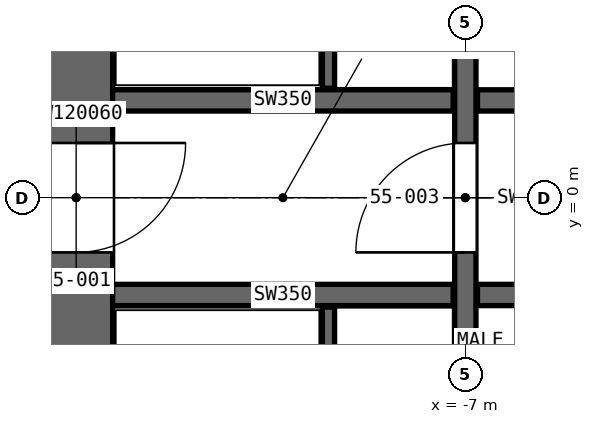
"""IFC4 building model, lengths in metres.
Left out: names, types, materials, properties, quantities, classifications, styles, units other than length and angle.
Written with IfcOpenShell. Run it as: python <this file> out.ifc"""

import sys

from ifc_helpers import new_model, si_unit, direction, frame, frame_2d, origin, place, context, subcontext, project, spatial, rectangle, extrude, element, fill, save


model = new_model("IFC4")
c1 = context("Model", 3, precision=1e-05, world=origin(), true_north=direction((0.0, 1.0)))
c2 = subcontext(c1, "Body", "Model", "MODEL_VIEW")
j1 = project(units=[si_unit("LENGTHUNIT", "METRE"), si_unit("PLANEANGLEUNIT", "RADIAN")], contexts=[c1])
p1 = place(None, origin())
s1 = spatial("IfcSite", under=j1, at=p1, CompositionType="ELEMENT")
p2 = place(p1, origin())
s2 = spatial("IfcBuilding", under=s1, at=p2, CompositionType="ELEMENT")
p3 = place(p2, frame((0.0, 0.0, 249.4)))
s3 = spatial("IfcBuildingStorey", under=s2, at=p3, CompositionType="ELEMENT", Elevation=249.4)
p4 = place(p3, frame((-13.4, 8.8, 0.0), z_axis=(0.0, 0.0, 1.0), x_axis=(0.0, -1.0, 0.0)))
e1 = element("IfcWall", 1, at=p4, inside=s3, PredefinedType="SHEAR", context=c2, shape_type="SweptSolid", body=[
    extrude(rectangle(XDim=17.6, YDim=1.2, at=frame_2d((8.8, 0.0))), origin(), (0.0, 0.0, 1.0), 4.2),
])
p5 = place(p4, frame((7.9, 0.0, 0.0)))
e2 = element("IfcOpeningElement", 2, at=p5, cuts=e1, PredefinedType="OPENING", context=c2, shape_type="SweptSolid", body=[
    extrude(rectangle(XDim=1.8, YDim=2.4, at=frame_2d((0.9, 1.2))), frame((0.0, 0.61, 0.0), z_axis=(0.0, -1.0, 0.0), x_axis=(1.0, 0.0, 0.0)), (0.0, 0.0, 1.0), 1.22),
])
p6 = place(p4, frame((16.5, 0.0, 0.0)))
e3 = element("IfcOpeningElement", 3, at=p6, cuts=e1, PredefinedType="OPENING", context=c2, shape_type="SweptSolid", body=[
    extrude(rectangle(XDim=1.0, YDim=2.4, at=frame_2d((0.5, 1.2))), frame((0.0, 0.61, 0.0), z_axis=(0.0, -1.0, 0.0), x_axis=(1.0, 0.0, 0.0)), (0.0, 0.0, 1.0), 1.22),
])
p7 = place(p3, frame((-7.0, -8.8, 0.0), z_axis=(0.0, 0.0, 1.0), x_axis=(0.0, 1.0, 0.0)))
e4 = element("IfcWall", 4, at=p7, inside=s3, PredefinedType="SHEAR", context=c2, shape_type="SweptSolid", body=[
    extrude(rectangle(XDim=17.6, YDim=0.35, at=frame_2d((8.8, 0.0))), origin(), (0.0, 0.0, 1.0), 4.2),
])
p8 = place(p7, frame((7.9, 0.0, 0.0)))
e5 = element("IfcOpeningElement", 5, at=p8, cuts=e4, PredefinedType="OPENING", context=c2, shape_type="SweptSolid", body=[
    extrude(rectangle(XDim=1.8, YDim=2.4, at=frame_2d((0.9, 1.2))), frame((0.0, 0.185, 0.0), z_axis=(0.0, -1.0, 0.0), x_axis=(1.0, 0.0, 0.0)), (0.0, 0.0, 1.0), 0.37),
])
p9 = place(p3, frame((-6.8, 1.6, 0.0), z_axis=(0.0, 0.0, 1.0), x_axis=(1.0, 0.0, 0.0)))
e6 = element("IfcWall", 6, at=p9, inside=s3, PredefinedType="SHEAR", context=c2, shape_type="SweptSolid", body=[
    extrude(rectangle(XDim=13.6, YDim=0.35, at=frame_2d((6.8, 0.0))), origin(), (0.0, 0.0, 1.0), 4.2),
])
p10 = place(p9, frame((11.95, 0.0, 0.0)))
e7 = element("IfcOpeningElement", 7, at=p10, cuts=e6, PredefinedType="OPENING", context=c2, shape_type="SweptSolid", body=[
    extrude(rectangle(XDim=0.9, YDim=2.4, at=frame_2d((0.45, 1.2))), frame((0.0, 0.185, 0.0), z_axis=(0.0, -1.0, 0.0), x_axis=(1.0, 0.0, 0.0)), (0.0, 0.0, 1.0), 0.37),
])
p11 = place(p9, frame((4.5, 0.0, 0.0)))
e8 = element("IfcOpeningElement", 8, at=p11, cuts=e6, PredefinedType="OPENING", context=c2, shape_type="SweptSolid", body=[
    extrude(rectangle(XDim=1.8, YDim=2.4, at=frame_2d((0.9, 1.2))), frame((0.0, 0.185, 0.0), z_axis=(0.0, -1.0, 0.0), x_axis=(1.0, 0.0, 0.0)), (0.0, 0.0, 1.0), 0.37),
])
p12 = place(p3, frame((-6.8, -1.6, 0.0), z_axis=(0.0, 0.0, 1.0), x_axis=(1.0, 0.0, 0.0)))
e9 = element("IfcWall", 9, at=p12, inside=s3, PredefinedType="SHEAR", context=c2, shape_type="SweptSolid", body=[
    extrude(rectangle(XDim=13.6, YDim=0.35, at=frame_2d((6.8, 0.0))), origin(), (0.0, 0.0, 1.0), 4.2),
])
p13 = place(p12, frame((1.265, 0.0, 0.0)))
e10 = element("IfcOpeningElement", 10, at=p13, cuts=e9, PredefinedType="OPENING", context=c2, shape_type="SweptSolid", body=[
    extrude(rectangle(XDim=1.0, YDim=2.4, at=frame_2d((0.5, 1.2))), frame((0.0, 0.185, 0.0), z_axis=(0.0, -1.0, 0.0), x_axis=(1.0, 0.0, 0.0)), (0.0, 0.0, 1.0), 0.37),
])
p14 = place(p12, frame((4.95, 0.0, 0.0)))
e11 = element("IfcOpeningElement", 11, at=p14, cuts=e9, PredefinedType="OPENING", context=c2, shape_type="SweptSolid", body=[
    extrude(rectangle(XDim=1.1, YDim=2.4, at=frame_2d((0.55, 1.2))), frame((0.0, 0.185, 0.0), z_axis=(0.0, -1.0, 0.0), x_axis=(1.0, 0.0, 0.0)), (0.0, 0.0, 1.0), 0.37),
])
p15 = place(p12, frame((8.635, 0.0, 0.0)))
e12 = element("IfcOpeningElement", 12, at=p15, cuts=e9, PredefinedType="OPENING", context=c2, shape_type="SweptSolid", body=[
    extrude(rectangle(XDim=1.0, YDim=2.4, at=frame_2d((0.5, 1.2))), frame((0.0, 0.185, 0.0), z_axis=(0.0, -1.0, 0.0), x_axis=(1.0, 0.0, 0.0)), (0.0, 0.0, 1.0), 0.37),
])
p16 = place(p12, frame((11.9, 0.0, 0.0)))
e13 = element("IfcOpeningElement", 13, at=p16, cuts=e9, PredefinedType="OPENING", context=c2, shape_type="SweptSolid", body=[
    extrude(rectangle(XDim=1.0, YDim=2.4, at=frame_2d((0.5, 1.2))), frame((0.0, 0.185, 0.0), z_axis=(0.0, -1.0, 0.0), x_axis=(1.0, 0.0, 0.0)), (0.0, 0.0, 1.0), 0.37),
])
for number, where, z_axis, x_axis in (
    (14, (-12.8, 1.6, 0.0), (0.0, 0.0, 1.0), (1.0, 0.0, 0.0)),
    (15, (-12.8, -1.6, 0.0), (0.0, 0.0, 1.0), (1.0, 0.0, 0.0)),
):
    element("IfcWall", number, at=place(p3, frame(where, z_axis=z_axis, x_axis=x_axis)), inside=s3, PredefinedType="SHEAR", context=c2, shape_type="SweptSolid", body=[
        extrude(rectangle(XDim=5.6, YDim=0.35, at=frame_2d((2.8, 0.0))), origin(), (0.0, 0.0, 1.0), 4.2),
    ])
for number, where, z_axis, x_axis in (
    (16, (-9.25, 7.2, 0.0), (0.0, 0.0, 1.0), (0.0, -1.0, 0.0)),
    (17, (-9.25, -7.2, 0.0), (0.0, 0.0, 1.0), (0.0, 1.0, 0.0)),
):
    element("IfcWall", number, at=place(p3, frame(where, z_axis=z_axis, x_axis=x_axis)), inside=s3, PredefinedType="SOLIDWALL", context=c2, shape_type="SweptSolid", body=[
        extrude(rectangle(XDim=5.4, YDim=0.2, at=frame_2d((2.7, 0.0))), origin(), (0.0, 0.0, 1.0), 4.2),
    ])
p17 = place(p5, origin())
e18 = element("IfcDoor", 18, at=p17, inside=s3, OperationType="DOUBLE_DOOR_SINGLE_SWING", PredefinedType="DOOR", context=c2, shape_type="SweptSolid", body=[
    extrude(rectangle(XDim=1.8, YDim=2.4, at=frame_2d((0.9, 1.2))), frame((0.0, 0.025, 0.0), z_axis=(0.0, -1.0, 0.0), x_axis=(1.0, 0.0, 0.0)), (0.0, 0.0, 1.0), 0.05),
])
fill(e2, e18)
p18 = place(p8, origin())
e19 = element("IfcDoor", 19, at=p18, inside=s3, OperationType="DOUBLE_DOOR_SINGLE_SWING", PredefinedType="DOOR", context=c2, shape_type="SweptSolid", body=[
    extrude(rectangle(XDim=1.8, YDim=2.4, at=frame_2d((0.9, 1.2))), frame((0.0, 0.025, 0.0), z_axis=(0.0, -1.0, 0.0), x_axis=(1.0, 0.0, 0.0)), (0.0, 0.0, 1.0), 0.05),
])
fill(e5, e19)
save(model, sys.argv[1])
